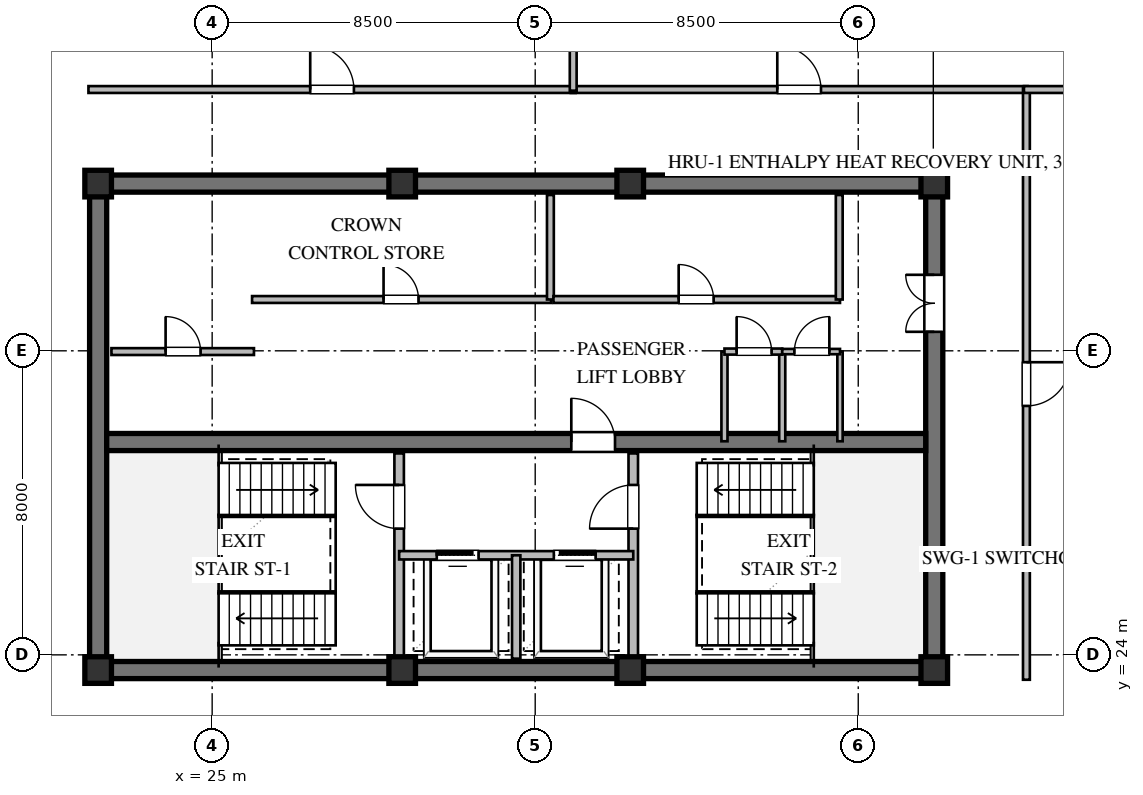
"""IFC4 building model, lengths in metres.
Left out: names, types, materials, properties, quantities, classifications, styles, units other than length and angle.
Written with IfcOpenShell. Run it as: python <this file> out.ifc"""

import sys

from ifc_helpers import new_model, si_unit, direction, frame, frame_2d, origin, origin_2d, place, context, subcontext, project, spatial, rectangle, extrude, element, fill, save


model = new_model("IFC4")
c1 = context("Model", 3, precision=1e-05, world=origin(), true_north=direction((0.0, 1.0)))
c2 = subcontext(c1, "Body", "Model", "MODEL_VIEW")
j1 = project(units=[si_unit("LENGTHUNIT", "METRE"), si_unit("PLANEANGLEUNIT", "RADIAN")], contexts=[c1])
p1 = place(None, origin())
s1 = spatial("IfcSite", under=j1, at=p1, CompositionType="ELEMENT")
p2 = place(p1, origin())
s2 = spatial("IfcBuilding", under=s1, at=p2, CompositionType="ELEMENT")
p3 = place(p2, frame((0.0, 0.0, 300.8)))
s3 = spatial("IfcBuildingStorey", under=s2, at=p3, CompositionType="ELEMENT", Elevation=300.8)
for number, where, z_axis, x_axis in (
    (1, (21.775, 23.6, 0.0), (0.0, 0.0, 1.0), (1.0, 0.0, 0.0)),
    (2, (21.775, 36.4, 0.0), (0.0, 0.0, 1.0), (1.0, 0.0, 0.0)),
):
    element("IfcWall", number, at=place(p3, frame(where, z_axis=z_axis, x_axis=x_axis)), inside=s3, PredefinedType="SHEAR", context=c2, shape_type="SweptSolid", body=[
        extrude(rectangle(XDim=22.45, YDim=0.45, at=frame_2d((11.225, 0.0))), origin(), (0.0, 0.0, 1.0), 3.72),
    ])
p4 = place(p3, frame((22.0, 23.825, 0.0), z_axis=(0.0, 0.0, 1.0), x_axis=(0.0, 1.0, 0.0)))
e3 = element("IfcWall", 3, at=p4, inside=s3, PredefinedType="SHEAR", context=c2, shape_type="SweptSolid", body=[
    extrude(rectangle(XDim=12.35, YDim=0.45, at=frame_2d((6.175, 0.0))), origin(), (0.0, 0.0, 1.0), 3.72),
])
p5 = place(p3, frame((44.0, 23.825, 0.0), z_axis=(0.0, 0.0, 1.0), x_axis=(0.0, 1.0, 0.0)))
e4 = element("IfcWall", 4, at=p5, inside=s3, PredefinedType="SHEAR", context=c2, shape_type="SweptSolid", body=[
    extrude(rectangle(XDim=12.35, YDim=0.45, at=frame_2d((6.175, 0.0))), origin(), (0.0, 0.0, 1.0), 3.72),
])
p6 = place(p5, frame((8.675, 0.0, 0.0)))
e5 = element("IfcOpeningElement", 5, at=p6, cuts=e4, PredefinedType="OPENING", context=c2, shape_type="SweptSolid", body=[
    extrude(rectangle(XDim=1.5, YDim=2.15, at=frame_2d((0.75, 1.075))), frame((0.0, 0.235, 0.0), z_axis=(0.0, -1.0, 0.0), x_axis=(1.0, 0.0, 0.0)), (0.0, 0.0, 1.0), 0.47),
])
p7 = place(p3, frame((22.225, 29.6, 0.0), z_axis=(0.0, 0.0, 1.0), x_axis=(1.0, 0.0, 0.0)))
e6 = element("IfcWall", 6, at=p7, inside=s3, PredefinedType="SHEAR", context=c2, shape_type="SweptSolid", body=[
    extrude(rectangle(XDim=21.55, YDim=0.45, at=frame_2d((10.775, 0.0))), origin(), (0.0, 0.0, 1.0), 3.72),
])
p8 = place(p7, frame((12.225, 0.0, 0.0)))
e7 = element("IfcOpeningElement", 7, at=p8, cuts=e6, PredefinedType="OPENING", context=c2, shape_type="SweptSolid", body=[
    extrude(rectangle(XDim=1.15, YDim=2.1, at=frame_2d((0.575, 1.05))), frame((0.0, 0.235, 0.0), z_axis=(0.0, -1.0, 0.0), x_axis=(1.0, 0.0, 0.0)), (0.0, 0.0, 1.0), 0.47),
])
for number, where, z_axis, x_axis in (
    (8, (22.0, 23.6, 0.0), (0.0, 0.0, 1.0), (1.0, 0.0, 0.0)),
    (9, (30.0, 23.6, 0.0), (0.0, 0.0, 1.0), (1.0, 0.0, 0.0)),
    (10, (36.0, 23.6, 0.0), (0.0, 0.0, 1.0), (1.0, 0.0, 0.0)),
    (11, (44.0, 23.6, 0.0), (0.0, 0.0, 1.0), (1.0, 0.0, 0.0)),
    (12, (44.0, 36.4, 0.0), (0.0, 0.0, 1.0), (1.0, 0.0, 0.0)),
    (13, (36.0, 36.4, 0.0), (0.0, 0.0, 1.0), (1.0, 0.0, 0.0)),
    (14, (30.0, 36.4, 0.0), (0.0, 0.0, 1.0), (1.0, 0.0, 0.0)),
    (15, (22.0, 36.4, 0.0), (0.0, 0.0, 1.0), (1.0, 0.0, 0.0)),
):
    element("IfcColumn", number, at=place(p3, frame(where, z_axis=z_axis, x_axis=x_axis)), inside=s3, PredefinedType="COLUMN", context=c2, shape_type="SweptSolid", body=[
        extrude(rectangle(XDim=0.7, YDim=0.7, at=origin_2d()), origin(), (0.0, 0.0, 1.0), 4.0),
    ])
p9 = place(p3, frame((56.357, 23.077, 0.0), z_axis=(0.0, 0.0, 1.0), x_axis=(-0.814111303181, -0.580708865123, 0.0)))
e16 = element("IfcWall", 16, at=p9, inside=s3, PredefinedType="STANDARD", context=c2, shape_type="SweptSolid", body=[
    extrude(rectangle(XDim=12.481, YDim=0.3, at=frame_2d((6.24, 0.0))), origin(), (0.0, 0.0, 1.0), 3.72),
])
p10 = place(p3, frame((29.92, 23.9, 0.0), z_axis=(0.0, 0.0, 1.0), x_axis=(0.0, 1.0, 0.0)))
e17 = element("IfcWall", 17, at=p10, inside=s3, PredefinedType="SOLIDWALL", context=c2, shape_type="SweptSolid", body=[
    extrude(rectangle(XDim=5.4, YDim=0.25, at=frame_2d((2.7, 0.0))), origin(), (0.0, 0.0, 1.0), 3.72),
])
p11 = place(p10, frame((3.421, 0.0, 0.0)))
e18 = element("IfcOpeningElement", 18, at=p11, cuts=e17, PredefinedType="OPENING", context=c2, shape_type="SweptSolid", body=[
    extrude(rectangle(XDim=1.15, YDim=2.1, at=frame_2d((0.575, 1.05))), frame((0.0, 0.135, 0.0), z_axis=(0.0, -1.0, 0.0), x_axis=(1.0, 0.0, 0.0)), (0.0, 0.0, 1.0), 0.27),
])
p12 = place(p3, frame((36.08, 23.9, 0.0), z_axis=(0.0, 0.0, 1.0), x_axis=(0.0, 1.0, 0.0)))
e19 = element("IfcWall", 19, at=p12, inside=s3, PredefinedType="SOLIDWALL", context=c2, shape_type="SweptSolid", body=[
    extrude(rectangle(XDim=5.4, YDim=0.25, at=frame_2d((2.7, 0.0))), origin(), (0.0, 0.0, 1.0), 3.72),
])
p13 = place(p12, frame((3.421, 0.0, 0.0)))
e20 = element("IfcOpeningElement", 20, at=p13, cuts=e19, PredefinedType="OPENING", context=c2, shape_type="SweptSolid", body=[
    extrude(rectangle(XDim=1.15, YDim=2.1, at=frame_2d((0.575, 1.05))), frame((0.0, 0.135, 0.0), z_axis=(0.0, -1.0, 0.0), x_axis=(1.0, 0.0, 0.0)), (0.0, 0.0, 1.0), 0.27),
])
p14 = place(p3, frame((29.92, 26.62, 0.0), z_axis=(0.0, 0.0, 1.0), x_axis=(1.0, 0.0, 0.0)))
e21 = element("IfcWall", 21, at=p14, inside=s3, PredefinedType="SOLIDWALL", context=c2, shape_type="SweptSolid", body=[
    extrude(rectangle(XDim=6.16, YDim=0.22, at=frame_2d((3.08, 0.0))), origin(), (0.0, 0.0, 1.0), 3.72),
])
p15 = place(p14, frame((0.99, 0.0, 0.0)))
e22 = element("IfcOpeningElement", 22, at=p15, cuts=e21, PredefinedType="OPENING", context=c2, shape_type="SweptSolid", body=[
    extrude(rectangle(XDim=1.1, YDim=2.1, at=frame_2d((0.55, 1.05))), frame((0.0, 0.12, 0.0), z_axis=(0.0, -1.0, 0.0), x_axis=(1.0, 0.0, 0.0)), (0.0, 0.0, 1.0), 0.24),
])
p16 = place(p14, frame((4.07, 0.0, 0.0)))
e23 = element("IfcOpeningElement", 23, at=p16, cuts=e21, PredefinedType="OPENING", context=c2, shape_type="SweptSolid", body=[
    extrude(rectangle(XDim=1.1, YDim=2.1, at=frame_2d((0.55, 1.05))), frame((0.0, 0.12, 0.0), z_axis=(0.0, -1.0, 0.0), x_axis=(1.0, 0.0, 0.0)), (0.0, 0.0, 1.0), 0.24),
])
p17 = place(p3, frame((33.0, 23.9, 0.0), z_axis=(0.0, 0.0, 1.0), x_axis=(0.0, 1.0, 0.0)))
e24 = element("IfcWall", 24, at=p17, inside=s3, PredefinedType="SOLIDWALL", context=c2, shape_type="SweptSolid", body=[
    extrude(rectangle(XDim=2.72, YDim=0.22, at=frame_2d((1.36, 0.0))), origin(), (0.0, 0.0, 1.0), 3.72),
])
p18 = place(p3, frame((26.05, 33.35, 0.0), z_axis=(0.0, 0.0, 1.0), x_axis=(1.0, 0.0, 0.0)))
e25 = element("IfcWall", 25, at=p18, inside=s3, PredefinedType="PARTITIONING", context=c2, shape_type="SweptSolid", body=[
    extrude(rectangle(XDim=7.87, YDim=0.18, at=frame_2d((3.935, 0.0))), origin(), (0.0, 0.0, 1.0), 3.72),
])
p19 = place(p18, frame((3.46, 0.0, 0.0)))
e26 = element("IfcOpeningElement", 26, at=p19, cuts=e25, PredefinedType="OPENING", context=c2, shape_type="SweptSolid", body=[
    extrude(rectangle(XDim=0.92, YDim=2.1, at=frame_2d((0.46, 1.05))), frame((0.0, 0.1, 0.0), z_axis=(0.0, -1.0, 0.0), x_axis=(1.0, 0.0, 0.0)), (0.0, 0.0, 1.0), 0.2),
])
p20 = place(p3, frame((33.9, 33.35, 0.0), z_axis=(0.0, 0.0, 1.0), x_axis=(0.0, 1.0, 0.0)))
e27 = element("IfcWall", 27, at=p20, inside=s3, PredefinedType="PARTITIONING", context=c2, shape_type="SweptSolid", body=[
    extrude(rectangle(XDim=2.75, YDim=0.18, at=frame_2d((1.375, 0.0))), origin(), (0.0, 0.0, 1.0), 3.72),
])
p21 = place(p3, frame((33.98, 33.35, 0.0), z_axis=(0.0, 0.0, 1.0), x_axis=(1.0, 0.0, 0.0)))
e28 = element("IfcWall", 28, at=p21, inside=s3, PredefinedType="PARTITIONING", context=c2, shape_type="SweptSolid", body=[
    extrude(rectangle(XDim=7.54, YDim=0.18, at=frame_2d((3.77, 0.0))), origin(), (0.0, 0.0, 1.0), 3.72),
])
p22 = place(p21, frame((3.295, 0.0, 0.0)))
e29 = element("IfcOpeningElement", 29, at=p22, cuts=e28, PredefinedType="OPENING", context=c2, shape_type="SweptSolid", body=[
    extrude(rectangle(XDim=0.92, YDim=2.1, at=frame_2d((0.46, 1.05))), frame((0.0, 0.1, 0.0), z_axis=(0.0, -1.0, 0.0), x_axis=(1.0, 0.0, 0.0)), (0.0, 0.0, 1.0), 0.2),
])
p23 = place(p3, frame((41.5, 33.35, 0.0), z_axis=(0.0, 0.0, 1.0), x_axis=(0.0, 1.0, 0.0)))
e30 = element("IfcWall", 30, at=p23, inside=s3, PredefinedType="PARTITIONING", context=c2, shape_type="SweptSolid", body=[
    extrude(rectangle(XDim=2.75, YDim=0.18, at=frame_2d((1.375, 0.0))), origin(), (0.0, 0.0, 1.0), 3.72),
])
p24 = place(p3, frame((22.35, 31.98, 0.0), z_axis=(0.0, 0.0, 1.0), x_axis=(1.0, 0.0, 0.0)))
e31 = element("IfcWall", 31, at=p24, inside=s3, PredefinedType="PARTITIONING", context=c2, shape_type="SweptSolid", body=[
    extrude(rectangle(XDim=3.75, YDim=0.18, at=frame_2d((1.875, 0.0))), origin(), (0.0, 0.0, 1.0), 3.72),
])
p25 = place(p24, frame((1.425, 0.0, 0.0)))
e32 = element("IfcOpeningElement", 32, at=p25, cuts=e31, PredefinedType="OPENING", context=c2, shape_type="SweptSolid", body=[
    extrude(rectangle(XDim=0.92, YDim=2.1, at=frame_2d((0.46, 1.05))), frame((0.0, 0.1, 0.0), z_axis=(0.0, -1.0, 0.0), x_axis=(1.0, 0.0, 0.0)), (0.0, 0.0, 1.0), 0.2),
])
for number, where, z_axis, x_axis in (
    (33, (38.48, 29.62, 0.0), (0.0, 0.0, 1.0), (0.0, 1.0, 0.0)),
    (34, (40.0, 29.62, 0.0), (0.0, 0.0, 1.0), (0.0, 1.0, 0.0)),
):
    element("IfcWall", number, at=place(p3, frame(where, z_axis=z_axis, x_axis=x_axis)), inside=s3, PredefinedType="PLUMBINGWALL", context=c2, shape_type="SweptSolid", body=[
        extrude(rectangle(XDim=2.36, YDim=0.16, at=frame_2d((1.18, 0.0))), origin(), (0.0, 0.0, 1.0), 3.72),
    ])
p26 = place(p3, frame((41.52, 29.62, 0.0), z_axis=(0.0, 0.0, 1.0), x_axis=(0.0, 1.0, 0.0)))
e35 = element("IfcWall", 35, at=p26, inside=s3, PredefinedType="PARTITIONING", context=c2, shape_type="SweptSolid", body=[
    extrude(rectangle(XDim=2.36, YDim=0.14, at=frame_2d((1.18, 0.0))), origin(), (0.0, 0.0, 1.0), 3.72),
])
p27 = place(p3, frame((38.48, 31.98, 0.0), z_axis=(0.0, 0.0, 1.0), x_axis=(1.0, 0.0, 0.0)))
e36 = element("IfcWall", 36, at=p27, inside=s3, PredefinedType="PLUMBINGWALL", context=c2, shape_type="SweptSolid", body=[
    extrude(rectangle(XDim=1.52, YDim=0.16, at=frame_2d((0.76, 0.0))), origin(), (0.0, 0.0, 1.0), 3.72),
])
p28 = place(p27, frame((0.32, 0.0, 0.0)))
e37 = element("IfcOpeningElement", 37, at=p28, cuts=e36, PredefinedType="OPENING", context=c2, shape_type="SweptSolid", body=[
    extrude(rectangle(XDim=0.92, YDim=2.1, at=frame_2d((0.46, 1.05))), frame((0.0, 0.09, 0.0), z_axis=(0.0, -1.0, 0.0), x_axis=(1.0, 0.0, 0.0)), (0.0, 0.0, 1.0), 0.18),
])
p29 = place(p3, frame((40.0, 31.98, 0.0), z_axis=(0.0, 0.0, 1.0), x_axis=(1.0, 0.0, 0.0)))
e38 = element("IfcWall", 38, at=p29, inside=s3, PredefinedType="PARTITIONING", context=c2, shape_type="SweptSolid", body=[
    extrude(rectangle(XDim=1.52, YDim=0.14, at=frame_2d((0.76, 0.0))), origin(), (0.0, 0.0, 1.0), 3.72),
])
p30 = place(p29, frame((0.32, 0.0, 0.0)))
e39 = element("IfcOpeningElement", 39, at=p30, cuts=e38, PredefinedType="OPENING", context=c2, shape_type="SweptSolid", body=[
    extrude(rectangle(XDim=0.92, YDim=2.1, at=frame_2d((0.46, 1.05))), frame((0.0, 0.08, 0.0), z_axis=(0.0, -1.0, 0.0), x_axis=(1.0, 0.0, 0.0)), (0.0, 0.0, 1.0), 0.16),
])
p31 = place(p3, frame((21.745, 38.875, 0.0), z_axis=(0.0, 0.0, 1.0), x_axis=(1.0, 0.0, 0.0)))
e40 = element("IfcWall", 40, at=p31, inside=s3, PredefinedType="PARTITIONING", context=c2, shape_type="SweptSolid", body=[
    extrude(rectangle(XDim=12.82, YDim=0.18, at=frame_2d((6.41, 0.0))), origin(), (0.0, 0.0, 1.0), 3.72),
])
p32 = place(p31, frame((5.835, 0.0, 0.0)))
e41 = element("IfcOpeningElement", 41, at=p32, cuts=e40, PredefinedType="OPENING", context=c2, shape_type="SweptSolid", body=[
    extrude(rectangle(XDim=1.15, YDim=2.1, at=frame_2d((0.575, 1.05))), frame((0.0, 0.1, 0.0), z_axis=(0.0, -1.0, 0.0), x_axis=(1.0, 0.0, 0.0)), (0.0, 0.0, 1.0), 0.2),
])
p33 = place(p3, frame((34.435, 38.875, 0.0), z_axis=(0.0, 0.0, 1.0), x_axis=(1.0, 0.0, 0.0)))
e42 = element("IfcWall", 42, at=p33, inside=s3, PredefinedType="PARTITIONING", context=c2, shape_type="SweptSolid", body=[
    extrude(rectangle(XDim=12.02, YDim=0.18, at=frame_2d((6.01, 0.0))), origin(), (0.0, 0.0, 1.0), 3.72),
])
p34 = place(p33, frame((5.435, 0.0, 0.0)))
e43 = element("IfcOpeningElement", 43, at=p34, cuts=e42, PredefinedType="OPENING", context=c2, shape_type="SweptSolid", body=[
    extrude(rectangle(XDim=1.15, YDim=2.1, at=frame_2d((0.575, 1.05))), frame((0.0, 0.1, 0.0), z_axis=(0.0, -1.0, 0.0), x_axis=(1.0, 0.0, 0.0)), (0.0, 0.0, 1.0), 0.2),
])
p35 = place(p3, frame((46.425, 38.905, 0.0), z_axis=(0.0, 0.0, 1.0), x_axis=(0.0, -1.0, 0.0)))
e44 = element("IfcWall", 44, at=p35, inside=s3, PredefinedType="PARTITIONING", context=c2, shape_type="SweptSolid", body=[
    extrude(rectangle(XDim=15.56, YDim=0.18, at=frame_2d((7.78, 0.0))), origin(), (0.0, 0.0, 1.0), 3.72),
])
p36 = place(p35, frame((7.205, 0.0, 0.0)))
e45 = element("IfcOpeningElement", 45, at=p36, cuts=e44, PredefinedType="OPENING", context=c2, shape_type="SweptSolid", body=[
    extrude(rectangle(XDim=1.15, YDim=2.1, at=frame_2d((0.575, 1.05))), frame((0.0, 0.1, 0.0), z_axis=(0.0, -1.0, 0.0), x_axis=(1.0, 0.0, 0.0)), (0.0, 0.0, 1.0), 0.2),
])
p37 = place(p3, frame((34.5, 53.455, 0.0), z_axis=(0.0, 0.0, 1.0), x_axis=(0.0, -1.0, 0.0)))
e46 = element("IfcWall", 46, at=p37, inside=s3, PredefinedType="PARTITIONING", context=c2, shape_type="SweptSolid", body=[
    extrude(rectangle(XDim=14.61, YDim=0.18, at=frame_2d((7.305, 0.0))), origin(), (0.0, 0.0, 1.0), 3.72),
])
p38 = place(p3, frame((59.517, 38.875, 0.0), z_axis=(0.0, 0.0, 1.0), x_axis=(-1.0, 0.0, 0.0)))
e47 = element("IfcWall", 47, at=p38, inside=s3, PredefinedType="PARTITIONING", context=c2, shape_type="SweptSolid", body=[
    extrude(rectangle(XDim=13.157, YDim=0.18, at=frame_2d((6.579, 0.0))), origin(), (0.0, 0.0, 1.0), 3.72),
])
p39 = place(p11, origin())
e48 = element("IfcDoor", 48, at=p39, inside=s3, OperationType="SINGLE_SWING_RIGHT", PredefinedType="DOOR", context=c2, shape_type="SweptSolid", body=[
    extrude(rectangle(XDim=1.15, YDim=2.1, at=frame_2d((0.575, 1.05))), frame((0.0, 0.025, 0.0), z_axis=(0.0, -1.0, 0.0), x_axis=(1.0, 0.0, 0.0)), (0.0, 0.0, 1.0), 0.05),
])
fill(e18, e48)
p40 = place(p13, origin())
e49 = element("IfcDoor", 49, at=p40, inside=s3, OperationType="SINGLE_SWING_LEFT", PredefinedType="DOOR", context=c2, shape_type="SweptSolid", body=[
    extrude(rectangle(XDim=1.15, YDim=2.1, at=frame_2d((0.575, 1.05))), frame((0.0, 0.025, 0.0), z_axis=(0.0, -1.0, 0.0), x_axis=(1.0, 0.0, 0.0)), (0.0, 0.0, 1.0), 0.05),
])
fill(e20, e49)
p41 = place(p15, origin())
e50 = element("IfcDoor", 50, at=p41, inside=s3, OperationType="SLIDING_TO_LEFT", PredefinedType="DOOR", context=c2, shape_type="SweptSolid", body=[
    extrude(rectangle(XDim=1.1, YDim=2.1, at=frame_2d((0.55, 1.05))), frame((0.0, 0.025, 0.0), z_axis=(0.0, -1.0, 0.0), x_axis=(1.0, 0.0, 0.0)), (0.0, 0.0, 1.0), 0.05),
])
fill(e22, e50)
p42 = place(p16, origin())
e51 = element("IfcDoor", 51, at=p42, inside=s3, OperationType="SLIDING_TO_RIGHT", PredefinedType="DOOR", context=c2, shape_type="SweptSolid", body=[
    extrude(rectangle(XDim=1.1, YDim=2.1, at=frame_2d((0.55, 1.05))), frame((0.0, 0.025, 0.0), z_axis=(0.0, -1.0, 0.0), x_axis=(1.0, 0.0, 0.0)), (0.0, 0.0, 1.0), 0.05),
])
fill(e23, e51)
p43 = place(p8, origin())
e52 = element("IfcDoor", 52, at=p43, inside=s3, OperationType="SINGLE_SWING_LEFT", PredefinedType="DOOR", context=c2, shape_type="SweptSolid", body=[
    extrude(rectangle(XDim=1.15, YDim=2.1, at=frame_2d((0.575, 1.05))), frame((0.0, 0.025, 0.0), z_axis=(0.0, -1.0, 0.0), x_axis=(1.0, 0.0, 0.0)), (0.0, 0.0, 1.0), 0.05),
])
fill(e7, e52)
p44 = place(p6, origin())
e53 = element("IfcDoor", 53, at=p44, inside=s3, OperationType="DOUBLE_DOOR_SINGLE_SWING", PredefinedType="DOOR", context=c2, shape_type="SweptSolid", body=[
    extrude(rectangle(XDim=1.5, YDim=2.15, at=frame_2d((0.75, 1.075))), frame((0.0, 0.025, 0.0), z_axis=(0.0, -1.0, 0.0), x_axis=(1.0, 0.0, 0.0)), (0.0, 0.0, 1.0), 0.05),
])
fill(e5, e53)
p45 = place(p19, origin())
e54 = element("IfcDoor", 54, at=p45, inside=s3, OperationType="SINGLE_SWING_LEFT", PredefinedType="DOOR", context=c2, shape_type="SweptSolid", body=[
    extrude(rectangle(XDim=0.92, YDim=2.1, at=frame_2d((0.46, 1.05))), frame((0.0, 0.025, 0.0), z_axis=(0.0, -1.0, 0.0), x_axis=(1.0, 0.0, 0.0)), (0.0, 0.0, 1.0), 0.05),
])
fill(e26, e54)
p46 = place(p22, origin())
e55 = element("IfcDoor", 55, at=p46, inside=s3, OperationType="SINGLE_SWING_LEFT", PredefinedType="DOOR", context=c2, shape_type="SweptSolid", body=[
    extrude(rectangle(XDim=0.92, YDim=2.1, at=frame_2d((0.46, 1.05))), frame((0.0, 0.025, 0.0), z_axis=(0.0, -1.0, 0.0), x_axis=(1.0, 0.0, 0.0)), (0.0, 0.0, 1.0), 0.05),
])
fill(e29, e55)
p47 = place(p25, origin())
e56 = element("IfcDoor", 56, at=p47, inside=s3, OperationType="SINGLE_SWING_LEFT", PredefinedType="DOOR", context=c2, shape_type="SweptSolid", body=[
    extrude(rectangle(XDim=0.92, YDim=2.1, at=frame_2d((0.46, 1.05))), frame((0.0, 0.025, 0.0), z_axis=(0.0, -1.0, 0.0), x_axis=(1.0, 0.0, 0.0)), (0.0, 0.0, 1.0), 0.05),
])
fill(e32, e56)
p48 = place(p28, origin())
e57 = element("IfcDoor", 57, at=p48, inside=s3, OperationType="SINGLE_SWING_LEFT", PredefinedType="DOOR", context=c2, shape_type="SweptSolid", body=[
    extrude(rectangle(XDim=0.92, YDim=2.1, at=frame_2d((0.46, 1.05))), frame((0.0, 0.025, 0.0), z_axis=(0.0, -1.0, 0.0), x_axis=(1.0, 0.0, 0.0)), (0.0, 0.0, 1.0), 0.05),
])
fill(e37, e57)
p49 = place(p30, origin())
e58 = element("IfcDoor", 58, at=p49, inside=s3, OperationType="SINGLE_SWING_RIGHT", PredefinedType="DOOR", context=c2, shape_type="SweptSolid", body=[
    extrude(rectangle(XDim=0.92, YDim=2.1, at=frame_2d((0.46, 1.05))), frame((0.0, 0.025, 0.0), z_axis=(0.0, -1.0, 0.0), x_axis=(1.0, 0.0, 0.0)), (0.0, 0.0, 1.0), 0.05),
])
fill(e39, e58)
p50 = place(p32, origin())
e59 = element("IfcDoor", 59, at=p50, inside=s3, OperationType="SINGLE_SWING_LEFT", PredefinedType="DOOR", context=c2, shape_type="SweptSolid", body=[
    extrude(rectangle(XDim=1.15, YDim=2.1, at=frame_2d((0.575, 1.05))), frame((0.0, 0.025, 0.0), z_axis=(0.0, -1.0, 0.0), x_axis=(1.0, 0.0, 0.0)), (0.0, 0.0, 1.0), 0.05),
])
fill(e41, e59)
p51 = place(p34, origin())
e60 = element("IfcDoor", 60, at=p51, inside=s3, OperationType="SINGLE_SWING_LEFT", PredefinedType="DOOR", context=c2, shape_type="SweptSolid", body=[
    extrude(rectangle(XDim=1.15, YDim=2.1, at=frame_2d((0.575, 1.05))), frame((0.0, 0.025, 0.0), z_axis=(0.0, -1.0, 0.0), x_axis=(1.0, 0.0, 0.0)), (0.0, 0.0, 1.0), 0.05),
])
fill(e43, e60)
p52 = place(p36, origin())
e61 = element("IfcDoor", 61, at=p52, inside=s3, OperationType="SINGLE_SWING_LEFT", PredefinedType="DOOR", context=c2, shape_type="SweptSolid", body=[
    extrude(rectangle(XDim=1.15, YDim=2.1, at=frame_2d((0.575, 1.05))), frame((0.0, 0.025, 0.0), z_axis=(0.0, -1.0, 0.0), x_axis=(1.0, 0.0, 0.0)), (0.0, 0.0, 1.0), 0.05),
])
fill(e45, e61)
save(model, sys.argv[1])
